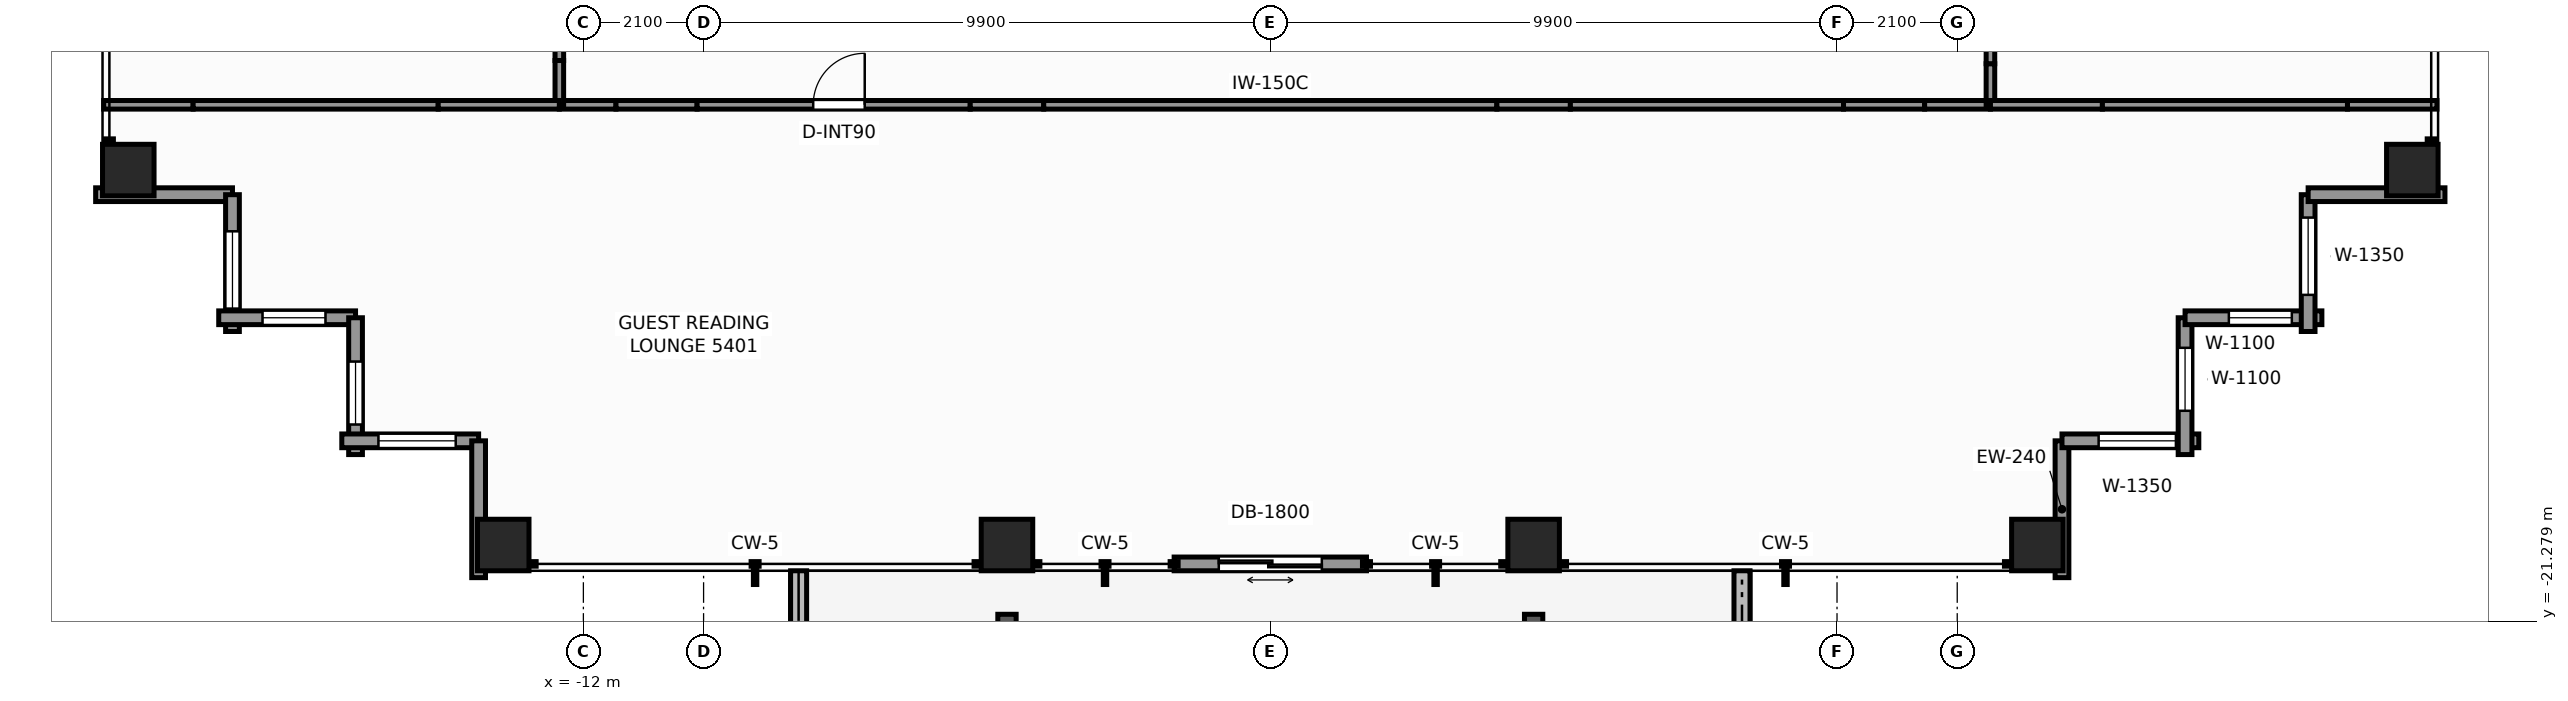
"""IFC4 building model, lengths in metres.
Left out: names, types, materials, properties, quantities, classifications, styles, units other than length and angle.
Written with IfcOpenShell. Run it as: python <this file> out.ifc"""

import sys

from ifc_helpers import new_model, si_unit, direction, frame, frame_2d, origin, origin_2d, place, context, subcontext, project, spatial, rectangle, extrude, element, fill, save


model = new_model("IFC4")
c1 = context("Model", 3, precision=1e-05, world=origin(), true_north=direction((0.0, 1.0)))
c2 = subcontext(c1, "Body", "Model", "MODEL_VIEW")
j1 = project(units=[si_unit("LENGTHUNIT", "METRE"), si_unit("PLANEANGLEUNIT", "RADIAN")], contexts=[c1])
p1 = place(None, origin())
s1 = spatial("IfcSite", under=j1, at=p1, CompositionType="ELEMENT")
p2 = place(p1, origin())
s2 = spatial("IfcBuilding", under=s1, at=p2, CompositionType="ELEMENT")
p3 = place(p2, frame((0.0, 0.0, 186.6)))
s3 = spatial("IfcBuildingStorey", under=s2, at=p3, CompositionType="ELEMENT", Elevation=186.6)
for number, where, z_axis, x_axis in (
    (1, (-13.4, -19.95, 0.0), (0.0, 0.0, 1.0), (1.0, 0.0, 0.0)),
    (2, (-4.6, -19.95, 0.0), (0.0, 0.0, 1.0), (1.0, 0.0, 0.0)),
    (3, (4.6, -19.95, 0.0), (0.0, 0.0, 1.0), (1.0, 0.0, 0.0)),
    (4, (13.4, -19.95, 0.0), (0.0, 0.0, 1.0), (1.0, 0.0, 0.0)),
    (5, (-19.95, -13.4, 0.0), (0.0, 0.0, 1.0), (1.0, 0.0, 0.0)),
    (6, (19.95, -13.4, 0.0), (0.0, 0.0, 1.0), (1.0, 0.0, 0.0)),
):
    element("IfcColumn", number, at=place(p3, frame(where, z_axis=z_axis, x_axis=x_axis)), inside=s3, PredefinedType="COLUMN", context=c2, shape_type="SweptSolid", body=[
        extrude(rectangle(XDim=0.9, YDim=0.9, at=origin_2d()), origin(), (0.0, 0.0, 1.0), 3.3),
    ])
p4 = place(p3, frame((8.24, -21.866, -0.04), z_axis=(0.0, 0.0, 1.0), x_axis=(0.0, 1.0, 0.0)))
e7 = element("IfcWall", 7, at=p4, inside=s3, PredefinedType="PARAPET", context=c2, shape_type="SweptSolid", body=[
    extrude(rectangle(XDim=1.466, YDim=0.28, at=frame_2d((0.733, 0.0))), origin(), (0.0, 0.0, 1.0), 0.42),
])
p5 = place(p3, frame((-8.24, -20.4, -0.04), z_axis=(0.0, 0.0, 1.0), x_axis=(0.0, -1.0, 0.0)))
e8 = element("IfcWall", 8, at=p5, inside=s3, PredefinedType="PARAPET", context=c2, shape_type="SweptSolid", body=[
    extrude(rectangle(XDim=2.674, YDim=0.28, at=frame_2d((1.337, 0.0))), origin(), (0.0, 0.0, 1.0), 0.42),
])
p6 = place(p3, frame((1.68, -20.28, 0.0), z_axis=(0.0, 0.0, 1.0), x_axis=(-1.0, 0.0, 0.0)))
e9 = element("IfcWall", 9, at=p6, inside=s3, PredefinedType="STANDARD", context=c2, shape_type="SweptSolid", body=[
    extrude(rectangle(XDim=3.36, YDim=0.24, at=frame_2d((1.68, 0.0))), origin(), (0.0, 0.0, 1.0), 3.08),
])
p7 = place(p6, frame((0.78, 0.0, 0.0)))
e10 = element("IfcOpeningElement", 10, at=p7, cuts=e9, PredefinedType="OPENING", context=c2, shape_type="SweptSolid", body=[
    extrude(rectangle(XDim=1.8, YDim=2.2, at=frame_2d((0.9, 1.1))), frame((0.0, 0.13, 0.0), z_axis=(0.0, -1.0, 0.0), x_axis=(1.0, 0.0, 0.0)), (0.0, 0.0, 1.0), 0.26),
])
p8 = place(p3, frame((13.83, -18.13, 0.0), z_axis=(0.0, 0.0, 1.0), x_axis=(0.0, -1.0, 0.0)))
e11 = element("IfcWall", 11, at=p8, inside=s3, PredefinedType="STANDARD", context=c2, shape_type="SweptSolid", body=[
    extrude(rectangle(XDim=2.39, YDim=0.24, at=frame_2d((1.195, 0.0))), origin(), (0.0, 0.0, 1.0), 1.275),
])
p9 = place(p3, frame((16.22, -18.13, 0.0), z_axis=(0.0, 0.0, 1.0), x_axis=(-1.0, 0.0, 0.0)))
e12 = element("IfcWall", 12, at=p9, inside=s3, PredefinedType="STANDARD", context=c2, shape_type="SweptSolid", body=[
    extrude(rectangle(XDim=2.39, YDim=0.24, at=frame_2d((1.195, 0.0))), origin(), (0.0, 0.0, 1.0), 2.463),
])
p10 = place(p9, frame((0.4, 0.0, 0.65)))
e13 = element("IfcOpeningElement", 13, at=p10, cuts=e12, PredefinedType="OPENING", context=c2, shape_type="SweptSolid", body=[
    extrude(rectangle(XDim=1.35, YDim=1.55, at=frame_2d((0.675, 0.775))), frame((0.0, 0.13, 0.0), z_axis=(0.0, -1.0, 0.0), x_axis=(1.0, 0.0, 0.0)), (0.0, 0.0, 1.0), 0.26),
])
p11 = place(p3, frame((15.98, -15.98, 0.0), z_axis=(0.0, 0.0, 1.0), x_axis=(0.0, -1.0, 0.0)))
e14 = element("IfcWall", 14, at=p11, inside=s3, PredefinedType="STANDARD", context=c2, shape_type="SweptSolid", body=[
    extrude(rectangle(XDim=2.39, YDim=0.24, at=frame_2d((1.195, 0.0))), origin(), (0.0, 0.0, 1.0), 2.463),
])
p12 = place(p11, frame((0.525, 0.0, 0.65)))
e15 = element("IfcOpeningElement", 15, at=p12, cuts=e14, PredefinedType="OPENING", context=c2, shape_type="SweptSolid", body=[
    extrude(rectangle(XDim=1.1, YDim=1.45, at=frame_2d((0.55, 0.725))), frame((0.0, 0.13, 0.0), z_axis=(0.0, -1.0, 0.0), x_axis=(1.0, 0.0, 0.0)), (0.0, 0.0, 1.0), 0.26),
])
p13 = place(p3, frame((18.37, -15.98, 0.0), z_axis=(0.0, 0.0, 1.0), x_axis=(-1.0, 0.0, 0.0)))
e16 = element("IfcWall", 16, at=p13, inside=s3, PredefinedType="STANDARD", context=c2, shape_type="SweptSolid", body=[
    extrude(rectangle(XDim=2.39, YDim=0.24, at=frame_2d((1.195, 0.0))), origin(), (0.0, 0.0, 1.0), 2.463),
])
p14 = place(p13, frame((0.525, 0.0, 0.65)))
e17 = element("IfcOpeningElement", 17, at=p14, cuts=e16, PredefinedType="OPENING", context=c2, shape_type="SweptSolid", body=[
    extrude(rectangle(XDim=1.1, YDim=1.45, at=frame_2d((0.55, 0.725))), frame((0.0, 0.13, 0.0), z_axis=(0.0, -1.0, 0.0), x_axis=(1.0, 0.0, 0.0)), (0.0, 0.0, 1.0), 0.26),
])
p15 = place(p3, frame((18.13, -13.83, 0.0), z_axis=(0.0, 0.0, 1.0), x_axis=(0.0, -1.0, 0.0)))
e18 = element("IfcWall", 18, at=p15, inside=s3, PredefinedType="STANDARD", context=c2, shape_type="SweptSolid", body=[
    extrude(rectangle(XDim=2.39, YDim=0.24, at=frame_2d((1.195, 0.0))), origin(), (0.0, 0.0, 1.0), 2.463),
])
p16 = place(p15, frame((0.4, 0.0, 0.65)))
e19 = element("IfcOpeningElement", 19, at=p16, cuts=e18, PredefinedType="OPENING", context=c2, shape_type="SweptSolid", body=[
    extrude(rectangle(XDim=1.35, YDim=1.55, at=frame_2d((0.675, 0.775))), frame((0.0, 0.13, 0.0), z_axis=(0.0, -1.0, 0.0), x_axis=(1.0, 0.0, 0.0)), (0.0, 0.0, 1.0), 0.26),
])
for number, where, z_axis, x_axis in (
    (20, (20.52, -13.83, 0.0), (0.0, 0.0, 1.0), (-1.0, 0.0, 0.0)),
    (21, (-18.13, -13.83, 0.0), (0.0, 0.0, 1.0), (-1.0, 0.0, 0.0)),
):
    element("IfcWall", number, at=place(p3, frame(where, z_axis=z_axis, x_axis=x_axis)), inside=s3, PredefinedType="STANDARD", context=c2, shape_type="SweptSolid", body=[
        extrude(rectangle(XDim=2.39, YDim=0.24, at=frame_2d((1.195, 0.0))), origin(), (0.0, 0.0, 1.0), 1.275),
    ])
p17 = place(p3, frame((-18.13, -16.22, 0.0), z_axis=(0.0, 0.0, 1.0), x_axis=(0.0, 1.0, 0.0)))
e22 = element("IfcWall", 22, at=p17, inside=s3, PredefinedType="STANDARD", context=c2, shape_type="SweptSolid", body=[
    extrude(rectangle(XDim=2.39, YDim=0.24, at=frame_2d((1.195, 0.0))), origin(), (0.0, 0.0, 1.0), 2.463),
])
p18 = place(p17, frame((0.4, 0.0, 0.65)))
e23 = element("IfcOpeningElement", 23, at=p18, cuts=e22, PredefinedType="OPENING", context=c2, shape_type="SweptSolid", body=[
    extrude(rectangle(XDim=1.35, YDim=1.55, at=frame_2d((0.675, 0.775))), frame((0.0, 0.13, 0.0), z_axis=(0.0, -1.0, 0.0), x_axis=(1.0, 0.0, 0.0)), (0.0, 0.0, 1.0), 0.26),
])
p19 = place(p3, frame((-15.98, -15.98, 0.0), z_axis=(0.0, 0.0, 1.0), x_axis=(-1.0, 0.0, 0.0)))
e24 = element("IfcWall", 24, at=p19, inside=s3, PredefinedType="STANDARD", context=c2, shape_type="SweptSolid", body=[
    extrude(rectangle(XDim=2.39, YDim=0.24, at=frame_2d((1.195, 0.0))), origin(), (0.0, 0.0, 1.0), 2.463),
])
p20 = place(p19, frame((0.525, 0.0, 0.65)))
e25 = element("IfcOpeningElement", 25, at=p20, cuts=e24, PredefinedType="OPENING", context=c2, shape_type="SweptSolid", body=[
    extrude(rectangle(XDim=1.1, YDim=1.45, at=frame_2d((0.55, 0.725))), frame((0.0, 0.13, 0.0), z_axis=(0.0, -1.0, 0.0), x_axis=(1.0, 0.0, 0.0)), (0.0, 0.0, 1.0), 0.26),
])
p21 = place(p3, frame((-15.98, -18.37, 0.0), z_axis=(0.0, 0.0, 1.0), x_axis=(0.0, 1.0, 0.0)))
e26 = element("IfcWall", 26, at=p21, inside=s3, PredefinedType="STANDARD", context=c2, shape_type="SweptSolid", body=[
    extrude(rectangle(XDim=2.39, YDim=0.24, at=frame_2d((1.195, 0.0))), origin(), (0.0, 0.0, 1.0), 2.463),
])
p22 = place(p21, frame((0.525, 0.0, 0.65)))
e27 = element("IfcOpeningElement", 27, at=p22, cuts=e26, PredefinedType="OPENING", context=c2, shape_type="SweptSolid", body=[
    extrude(rectangle(XDim=1.1, YDim=1.45, at=frame_2d((0.55, 0.725))), frame((0.0, 0.13, 0.0), z_axis=(0.0, -1.0, 0.0), x_axis=(1.0, 0.0, 0.0)), (0.0, 0.0, 1.0), 0.26),
])
p23 = place(p3, frame((-13.83, -18.13, 0.0), z_axis=(0.0, 0.0, 1.0), x_axis=(-1.0, 0.0, 0.0)))
e28 = element("IfcWall", 28, at=p23, inside=s3, PredefinedType="STANDARD", context=c2, shape_type="SweptSolid", body=[
    extrude(rectangle(XDim=2.39, YDim=0.24, at=frame_2d((1.195, 0.0))), origin(), (0.0, 0.0, 1.0), 2.463),
])
p24 = place(p23, frame((0.4, 0.0, 0.65)))
e29 = element("IfcOpeningElement", 29, at=p24, cuts=e28, PredefinedType="OPENING", context=c2, shape_type="SweptSolid", body=[
    extrude(rectangle(XDim=1.35, YDim=1.55, at=frame_2d((0.675, 0.775))), frame((0.0, 0.13, 0.0), z_axis=(0.0, -1.0, 0.0), x_axis=(1.0, 0.0, 0.0)), (0.0, 0.0, 1.0), 0.26),
])
p25 = place(p3, frame((-13.83, -20.52, 0.0), z_axis=(0.0, 0.0, 1.0), x_axis=(0.0, 1.0, 0.0)))
e30 = element("IfcWall", 30, at=p25, inside=s3, PredefinedType="STANDARD", context=c2, shape_type="SweptSolid", body=[
    extrude(rectangle(XDim=2.39, YDim=0.24, at=frame_2d((1.195, 0.0))), origin(), (0.0, 0.0, 1.0), 1.275),
])
p26 = place(p3, frame((-12.42, -12.26, 0.0), z_axis=(0.0, 0.0, 1.0), x_axis=(1.0, 0.0, 0.0)))
e31 = element("IfcWall", 31, at=p26, inside=s3, PredefinedType="PARTITIONING", context=c2, shape_type="SweptSolid", body=[
    extrude(rectangle(XDim=0.99, YDim=0.15, at=frame_2d((0.495, 0.0))), origin(), (0.0, 0.0, 1.0), 3.08),
])
p27 = place(p3, frame((-11.43, -12.26, 0.0), z_axis=(0.0, 0.0, 1.0), x_axis=(1.0, 0.0, 0.0)))
e32 = element("IfcWall", 32, at=p27, inside=s3, PredefinedType="PARTITIONING", context=c2, shape_type="SweptSolid", body=[
    extrude(rectangle(XDim=1.417, YDim=0.15, at=frame_2d((0.708, 0.0))), origin(), (0.0, 0.0, 1.0), 1.265),
])
p28 = place(p3, frame((-10.014, -12.26, 0.0), z_axis=(0.0, 0.0, 1.0), x_axis=(1.0, 0.0, 0.0)))
e33 = element("IfcWall", 33, at=p28, inside=s3, PredefinedType="PARTITIONING", context=c2, shape_type="SweptSolid", body=[
    extrude(rectangle(XDim=4.772, YDim=0.15, at=frame_2d((2.386, 0.0))), origin(), (0.0, 0.0, 1.0), 3.08),
])
p29 = place(p28, frame((2.029, 0.0, 0.0)))
e34 = element("IfcOpeningElement", 34, at=p29, cuts=e33, PredefinedType="OPENING", context=c2, shape_type="SweptSolid", body=[
    extrude(rectangle(XDim=0.9, YDim=2.06, at=frame_2d((0.45, 1.03))), frame((0.0, 0.085, 0.0), z_axis=(0.0, -1.0, 0.0), x_axis=(1.0, 0.0, 0.0)), (0.0, 0.0, 1.0), 0.17),
])
p30 = place(p3, frame((-5.242, -12.26, 0.0), z_axis=(0.0, 0.0, 1.0), x_axis=(1.0, 0.0, 0.0)))
e35 = element("IfcWall", 35, at=p30, inside=s3, PredefinedType="PARTITIONING", context=c2, shape_type="SweptSolid", body=[
    extrude(rectangle(XDim=1.284, YDim=0.15, at=frame_2d((0.642, 0.0))), origin(), (0.0, 0.0, 1.0), 1.265),
])
p31 = place(p3, frame((-3.958, -12.26, 0.0), z_axis=(0.0, 0.0, 1.0), x_axis=(1.0, 0.0, 0.0)))
e36 = element("IfcWall", 36, at=p31, inside=s3, PredefinedType="PARTITIONING", context=c2, shape_type="SweptSolid", body=[
    extrude(rectangle(XDim=7.916, YDim=0.15, at=frame_2d((3.958, 0.0))), origin(), (0.0, 0.0, 1.0), 2.605),
])
p32 = place(p3, frame((3.958, -12.26, 0.0), z_axis=(0.0, 0.0, 1.0), x_axis=(1.0, 0.0, 0.0)))
e37 = element("IfcWall", 37, at=p32, inside=s3, PredefinedType="PARTITIONING", context=c2, shape_type="SweptSolid", body=[
    extrude(rectangle(XDim=1.284, YDim=0.15, at=frame_2d((0.642, 0.0))), origin(), (0.0, 0.0, 1.0), 1.265),
])
p33 = place(p3, frame((5.242, -12.26, 0.0), z_axis=(0.0, 0.0, 1.0), x_axis=(1.0, 0.0, 0.0)))
e38 = element("IfcWall", 38, at=p33, inside=s3, PredefinedType="PARTITIONING", context=c2, shape_type="SweptSolid", body=[
    extrude(rectangle(XDim=4.772, YDim=0.15, at=frame_2d((2.386, 0.0))), origin(), (0.0, 0.0, 1.0), 3.08),
])
p34 = place(p3, frame((10.014, -12.26, 0.0), z_axis=(0.0, 0.0, 1.0), x_axis=(1.0, 0.0, 0.0)))
e39 = element("IfcWall", 39, at=p34, inside=s3, PredefinedType="PARTITIONING", context=c2, shape_type="SweptSolid", body=[
    extrude(rectangle(XDim=1.417, YDim=0.15, at=frame_2d((0.708, 0.0))), origin(), (0.0, 0.0, 1.0), 1.265),
])
p35 = place(p3, frame((11.43, -12.26, 0.0), z_axis=(0.0, 0.0, 1.0), x_axis=(1.0, 0.0, 0.0)))
e40 = element("IfcWall", 40, at=p35, inside=s3, PredefinedType="PARTITIONING", context=c2, shape_type="SweptSolid", body=[
    extrude(rectangle(XDim=1.15, YDim=0.15, at=frame_2d((0.575, 0.0))), origin(), (0.0, 0.0, 1.0), 3.08),
])
p36 = place(p3, frame((-12.42, -12.26, 0.0), z_axis=(0.0, 0.0, 1.0), x_axis=(0.0, 1.0, 0.0)))
e41 = element("IfcWall", 41, at=p36, inside=s3, PredefinedType="PARTITIONING", context=c2, shape_type="SweptSolid", body=[
    extrude(rectangle(XDim=0.774, YDim=0.15, at=frame_2d((0.387, 0.0))), origin(), (0.0, 0.0, 1.0), 3.08),
])
p37 = place(p3, frame((-12.42, -11.486, 0.0), z_axis=(0.0, 0.0, 1.0), x_axis=(0.0, 1.0, 0.0)))
e42 = element("IfcWall", 42, at=p37, inside=s3, PredefinedType="PARTITIONING", context=c2, shape_type="SweptSolid", body=[
    extrude(rectangle(XDim=1.417, YDim=0.15, at=frame_2d((0.708, 0.0))), origin(), (0.0, 0.0, 1.0), 1.265),
])
p38 = place(p3, frame((12.58, -12.26, 0.0), z_axis=(0.0, 0.0, 1.0), x_axis=(0.0, 1.0, 0.0)))
e43 = element("IfcWall", 43, at=p38, inside=s3, PredefinedType="PARTITIONING", context=c2, shape_type="SweptSolid", body=[
    extrude(rectangle(XDim=0.718, YDim=0.15, at=frame_2d((0.359, 0.0))), origin(), (0.0, 0.0, 1.0), 3.08),
])
p39 = place(p3, frame((12.58, -11.542, 0.0), z_axis=(0.0, 0.0, 1.0), x_axis=(0.0, 1.0, 0.0)))
e44 = element("IfcWall", 44, at=p39, inside=s3, PredefinedType="PARTITIONING", context=c2, shape_type="SweptSolid", body=[
    extrude(rectangle(XDim=1.417, YDim=0.15, at=frame_2d((0.708, 0.0))), origin(), (0.0, 0.0, 1.0), 1.265),
])
p40 = place(p3, frame((-20.38, -12.26, 0.0), z_axis=(0.0, 0.0, 1.0), x_axis=(1.0, 0.0, 0.0)))
e45 = element("IfcWall", 45, at=p40, inside=s3, PredefinedType="PARTITIONING", context=c2, shape_type="SweptSolid", body=[
    extrude(rectangle(XDim=1.563, YDim=0.15, at=frame_2d((0.781, 0.0))), origin(), (0.0, 0.0, 1.0), 2.453),
])
p41 = place(p3, frame((-18.817, -12.26, 0.0), z_axis=(0.0, 0.0, 1.0), x_axis=(1.0, 0.0, 0.0)))
e46 = element("IfcWall", 46, at=p41, inside=s3, PredefinedType="PARTITIONING", context=c2, shape_type="SweptSolid", body=[
    extrude(rectangle(XDim=4.281, YDim=0.15, at=frame_2d((2.141, 0.0))), origin(), (0.0, 0.0, 1.0), 1.265),
])
p42 = place(p3, frame((-14.536, -12.26, 0.0), z_axis=(0.0, 0.0, 1.0), x_axis=(1.0, 0.0, 0.0)))
e47 = element("IfcWall", 47, at=p42, inside=s3, PredefinedType="PARTITIONING", context=c2, shape_type="SweptSolid", body=[
    extrude(rectangle(XDim=2.116, YDim=0.15, at=frame_2d((1.058, 0.0))), origin(), (0.0, 0.0, 1.0), 3.08),
])
p43 = place(p3, frame((12.58, -12.26, 0.0), z_axis=(0.0, 0.0, 1.0), x_axis=(1.0, 0.0, 0.0)))
e48 = element("IfcWall", 48, at=p43, inside=s3, PredefinedType="PARTITIONING", context=c2, shape_type="SweptSolid", body=[
    extrude(rectangle(XDim=1.956, YDim=0.15, at=frame_2d((0.978, 0.0))), origin(), (0.0, 0.0, 1.0), 3.08),
])
p44 = place(p3, frame((14.536, -12.26, 0.0), z_axis=(0.0, 0.0, 1.0), x_axis=(1.0, 0.0, 0.0)))
e49 = element("IfcWall", 49, at=p44, inside=s3, PredefinedType="PARTITIONING", context=c2, shape_type="SweptSolid", body=[
    extrude(rectangle(XDim=4.281, YDim=0.15, at=frame_2d((2.141, 0.0))), origin(), (0.0, 0.0, 1.0), 1.265),
])
p45 = place(p3, frame((18.817, -12.26, 0.0), z_axis=(0.0, 0.0, 1.0), x_axis=(1.0, 0.0, 0.0)))
e50 = element("IfcWall", 50, at=p45, inside=s3, PredefinedType="PARTITIONING", context=c2, shape_type="SweptSolid", body=[
    extrude(rectangle(XDim=1.563, YDim=0.15, at=frame_2d((0.781, 0.0))), origin(), (0.0, 0.0, 1.0), 2.453),
])
p46 = place(p7, origin())
e51 = element("IfcDoor", 51, at=p46, inside=s3, OperationType="DOUBLE_DOOR_SLIDING", PredefinedType="DOOR", context=c2, shape_type="SweptSolid", body=[
    extrude(rectangle(XDim=1.8, YDim=2.2, at=frame_2d((0.9, 1.1))), frame((0.0, 0.025, 0.0), z_axis=(0.0, -1.0, 0.0), x_axis=(1.0, 0.0, 0.0)), (0.0, 0.0, 1.0), 0.05),
])
fill(e10, e51)
p47 = place(p10, origin())
e52 = element("IfcWindow", 52, at=p47, inside=s3, PartitioningType="SINGLE_PANEL", PredefinedType="WINDOW", context=c2, shape_type="SweptSolid", body=[
    extrude(rectangle(XDim=1.35, YDim=1.55, at=frame_2d((0.675, 0.775))), frame((0.0, 0.03, 0.0), z_axis=(0.0, -1.0, 0.0), x_axis=(1.0, 0.0, 0.0)), (0.0, 0.0, 1.0), 0.06),
])
fill(e13, e52)
p48 = place(p12, origin())
e53 = element("IfcWindow", 53, at=p48, inside=s3, PartitioningType="SINGLE_PANEL", PredefinedType="WINDOW", context=c2, shape_type="SweptSolid", body=[
    extrude(rectangle(XDim=1.1, YDim=1.45, at=frame_2d((0.55, 0.725))), frame((0.0, 0.03, 0.0), z_axis=(0.0, -1.0, 0.0), x_axis=(1.0, 0.0, 0.0)), (0.0, 0.0, 1.0), 0.06),
])
fill(e15, e53)
p49 = place(p14, origin())
e54 = element("IfcWindow", 54, at=p49, inside=s3, PartitioningType="SINGLE_PANEL", PredefinedType="WINDOW", context=c2, shape_type="SweptSolid", body=[
    extrude(rectangle(XDim=1.1, YDim=1.45, at=frame_2d((0.55, 0.725))), frame((0.0, 0.03, 0.0), z_axis=(0.0, -1.0, 0.0), x_axis=(1.0, 0.0, 0.0)), (0.0, 0.0, 1.0), 0.06),
])
fill(e17, e54)
p50 = place(p16, origin())
e55 = element("IfcWindow", 55, at=p50, inside=s3, PartitioningType="SINGLE_PANEL", PredefinedType="WINDOW", context=c2, shape_type="SweptSolid", body=[
    extrude(rectangle(XDim=1.35, YDim=1.55, at=frame_2d((0.675, 0.775))), frame((0.0, 0.03, 0.0), z_axis=(0.0, -1.0, 0.0), x_axis=(1.0, 0.0, 0.0)), (0.0, 0.0, 1.0), 0.06),
])
fill(e19, e55)
p51 = place(p18, origin())
e56 = element("IfcWindow", 56, at=p51, inside=s3, PartitioningType="SINGLE_PANEL", PredefinedType="WINDOW", context=c2, shape_type="SweptSolid", body=[
    extrude(rectangle(XDim=1.35, YDim=1.55, at=frame_2d((0.675, 0.775))), frame((0.0, 0.03, 0.0), z_axis=(0.0, -1.0, 0.0), x_axis=(1.0, 0.0, 0.0)), (0.0, 0.0, 1.0), 0.06),
])
fill(e23, e56)
p52 = place(p20, origin())
e57 = element("IfcWindow", 57, at=p52, inside=s3, PartitioningType="SINGLE_PANEL", PredefinedType="WINDOW", context=c2, shape_type="SweptSolid", body=[
    extrude(rectangle(XDim=1.1, YDim=1.45, at=frame_2d((0.55, 0.725))), frame((0.0, 0.03, 0.0), z_axis=(0.0, -1.0, 0.0), x_axis=(1.0, 0.0, 0.0)), (0.0, 0.0, 1.0), 0.06),
])
fill(e25, e57)
p53 = place(p22, origin())
e58 = element("IfcWindow", 58, at=p53, inside=s3, PartitioningType="SINGLE_PANEL", PredefinedType="WINDOW", context=c2, shape_type="SweptSolid", body=[
    extrude(rectangle(XDim=1.1, YDim=1.45, at=frame_2d((0.55, 0.725))), frame((0.0, 0.03, 0.0), z_axis=(0.0, -1.0, 0.0), x_axis=(1.0, 0.0, 0.0)), (0.0, 0.0, 1.0), 0.06),
])
fill(e27, e58)
p54 = place(p24, origin())
e59 = element("IfcWindow", 59, at=p54, inside=s3, PartitioningType="SINGLE_PANEL", PredefinedType="WINDOW", context=c2, shape_type="SweptSolid", body=[
    extrude(rectangle(XDim=1.35, YDim=1.55, at=frame_2d((0.675, 0.775))), frame((0.0, 0.03, 0.0), z_axis=(0.0, -1.0, 0.0), x_axis=(1.0, 0.0, 0.0)), (0.0, 0.0, 1.0), 0.06),
])
fill(e29, e59)
p55 = place(p29, origin())
e60 = element("IfcDoor", 60, at=p55, inside=s3, OperationType="SINGLE_SWING_RIGHT", PredefinedType="DOOR", context=c2, shape_type="SweptSolid", body=[
    extrude(rectangle(XDim=0.9, YDim=2.06, at=frame_2d((0.45, 1.03))), frame((0.0, 0.025, 0.0), z_axis=(0.0, -1.0, 0.0), x_axis=(1.0, 0.0, 0.0)), (0.0, 0.0, 1.0), 0.05),
])
fill(e34, e60)
save(model, sys.argv[1])
